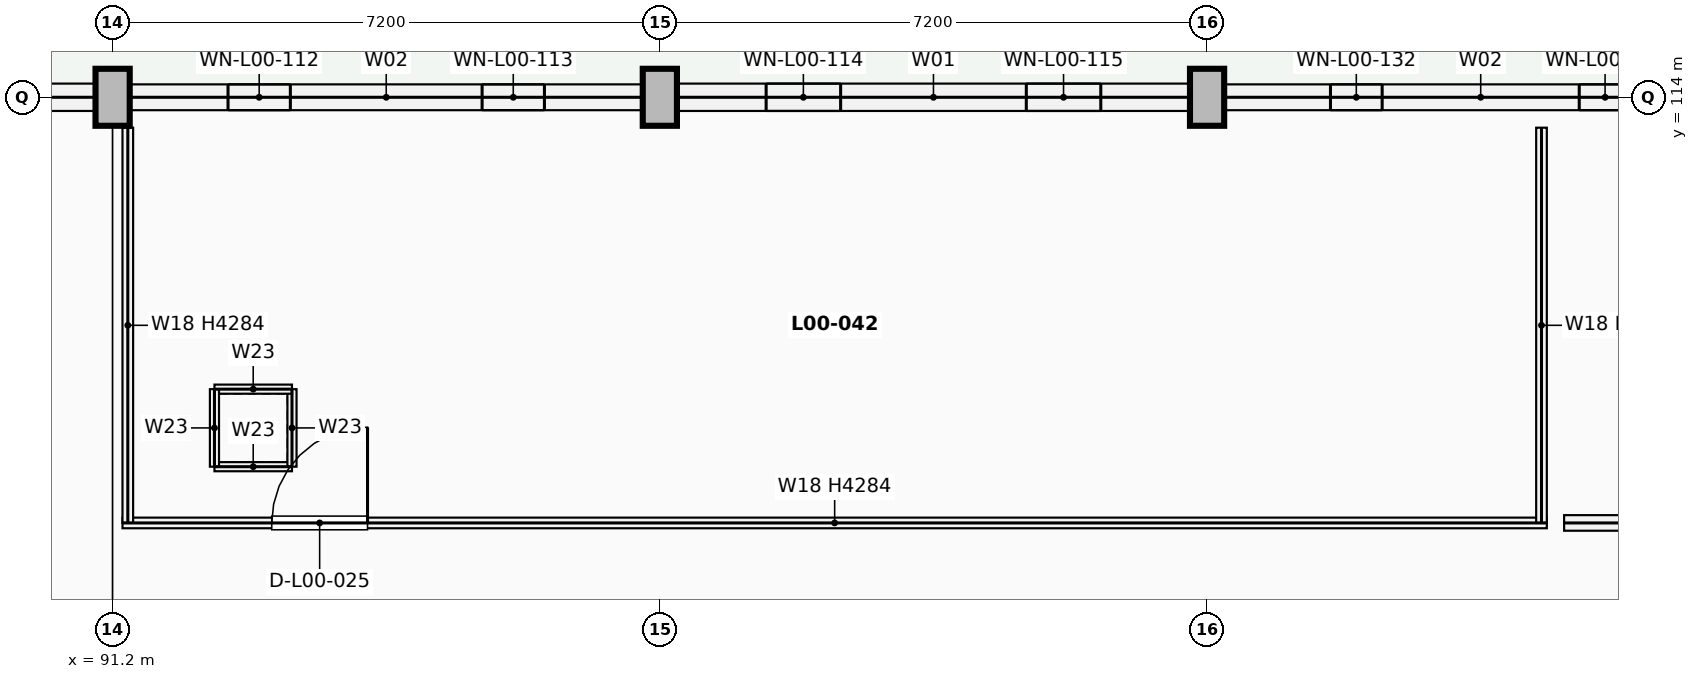
"""IFC4 building model, lengths in metres.
Left out: names, types, materials, properties, quantities, classifications, styles, units other than length and angle.
Written with IfcOpenShell. Run it as: python <this file> out.ifc"""

import sys

from ifc_helpers import new_model, si_unit, direction, frame, frame_2d, origin, origin_2d, place, context, subcontext, project, spatial, rectangle, extrude, element, fill, save


model = new_model("IFC4")
c1 = context("Model", 3, precision=1e-05, world=origin(), true_north=direction((0.0, 1.0)))
c2 = subcontext(c1, "Body", "Model", "MODEL_VIEW")
j1 = project(units=[si_unit("LENGTHUNIT", "METRE"), si_unit("PLANEANGLEUNIT", "RADIAN")], contexts=[c1])
p1 = place(None, origin())
s1 = spatial("IfcSite", under=j1, at=p1, CompositionType="ELEMENT")
p2 = place(p1, origin())
s2 = spatial("IfcBuilding", under=s1, at=p2, CompositionType="ELEMENT")
p3 = place(p2, origin())
s3 = spatial("IfcBuildingStorey", under=s2, at=p3, CompositionType="ELEMENT", Elevation=0.0)
for number, where, z_axis, x_axis in (
    (1, (91.2, 114.0, 0.0), (0.0, 0.0, 1.0), (1.0, 0.0, 0.0)),
    (2, (98.4, 114.0, 0.0), (0.0, 0.0, 1.0), (1.0, 0.0, 0.0)),
    (3, (105.6, 114.0, 0.0), (0.0, 0.0, 1.0), (1.0, 0.0, 0.0)),
):
    element("IfcColumn", number, at=place(p3, frame(where, z_axis=z_axis, x_axis=x_axis)), inside=s3, PredefinedType="PILASTER", context=c2, shape_type="SweptSolid", body=[
        extrude(rectangle(XDim=0.45, YDim=0.75, at=origin_2d()), origin(), (0.0, 0.0, 1.0), 5.1),
    ])
p4 = place(p3, frame((84.227, 114.0, 0.0), z_axis=(0.0, 0.0, 1.0), x_axis=(1.0, 0.0, 0.0)))
e4 = element("IfcWall", 4, at=p4, inside=s3, PredefinedType="SOLIDWALL", context=c2, shape_type="SweptSolid", body=[
    extrude(rectangle(XDim=6.746, YDim=0.36, at=frame_2d((3.373, 0.0))), origin(), (0.0, 0.0, 1.0), 4.284),
])
p5 = place(p4, frame((1.292, 0.0, 0.75)))
e5 = element("IfcOpeningElement", 5, at=p5, cuts=e4, PredefinedType="OPENING", context=c2, shape_type="SweptSolid", body=[
    extrude(rectangle(XDim=0.82, YDim=2.22, at=frame_2d((0.41, 1.11))), frame((0.0, 0.19, 0.0), z_axis=(0.0, -1.0, 0.0), x_axis=(1.0, 0.0, 0.0)), (0.0, 0.0, 1.0), 0.38),
])
p6 = place(p4, frame((4.635, 0.0, 0.75)))
e6 = element("IfcOpeningElement", 6, at=p6, cuts=e4, PredefinedType="OPENING", context=c2, shape_type="SweptSolid", body=[
    extrude(rectangle(XDim=0.82, YDim=2.22, at=frame_2d((0.41, 1.11))), frame((0.0, 0.19, 0.0), z_axis=(0.0, -1.0, 0.0), x_axis=(1.0, 0.0, 0.0)), (0.0, 0.0, 1.0), 0.38),
])
p7 = place(p3, frame((91.427, 114.0, 0.0), z_axis=(0.0, 0.0, 1.0), x_axis=(1.0, 0.0, 0.0)))
e7 = element("IfcWall", 7, at=p7, inside=s3, PredefinedType="SOLIDWALL", context=c2, shape_type="SweptSolid", body=[
    extrude(rectangle(XDim=6.746, YDim=0.34, at=frame_2d((3.373, 0.0))), origin(), (0.0, 0.0, 1.0), 4.284),
])
p8 = place(p7, frame((1.292, 0.0, 0.75)))
e8 = element("IfcOpeningElement", 8, at=p8, cuts=e7, PredefinedType="OPENING", context=c2, shape_type="SweptSolid", body=[
    extrude(rectangle(XDim=0.82, YDim=1.82, at=frame_2d((0.41, 0.91))), frame((0.0, 0.18, 0.0), z_axis=(0.0, -1.0, 0.0), x_axis=(1.0, 0.0, 0.0)), (0.0, 0.0, 1.0), 0.36),
])
p9 = place(p7, frame((4.635, 0.0, 0.75)))
e9 = element("IfcOpeningElement", 9, at=p9, cuts=e7, PredefinedType="OPENING", context=c2, shape_type="SweptSolid", body=[
    extrude(rectangle(XDim=0.82, YDim=1.82, at=frame_2d((0.41, 0.91))), frame((0.0, 0.18, 0.0), z_axis=(0.0, -1.0, 0.0), x_axis=(1.0, 0.0, 0.0)), (0.0, 0.0, 1.0), 0.36),
])
p10 = place(p3, frame((98.627, 114.0, 0.0), z_axis=(0.0, 0.0, 1.0), x_axis=(1.0, 0.0, 0.0)))
e10 = element("IfcWall", 10, at=p10, inside=s3, PredefinedType="SOLIDWALL", context=c2, shape_type="SweptSolid", body=[
    extrude(rectangle(XDim=6.746, YDim=0.36, at=frame_2d((3.373, 0.0))), origin(), (0.0, 0.0, 1.0), 4.284),
])
p11 = place(p10, frame((1.171, 0.0, 0.75)))
e11 = element("IfcOpeningElement", 11, at=p11, cuts=e10, PredefinedType="OPENING", context=c2, shape_type="SweptSolid", body=[
    extrude(rectangle(XDim=0.98, YDim=2.08, at=frame_2d((0.49, 1.04))), frame((0.0, 0.19, 0.0), z_axis=(0.0, -1.0, 0.0), x_axis=(1.0, 0.0, 0.0)), (0.0, 0.0, 1.0), 0.38),
])
p12 = place(p10, frame((4.594, 0.0, 0.75)))
e12 = element("IfcOpeningElement", 12, at=p12, cuts=e10, PredefinedType="OPENING", context=c2, shape_type="SweptSolid", body=[
    extrude(rectangle(XDim=0.98, YDim=2.08, at=frame_2d((0.49, 1.04))), frame((0.0, 0.19, 0.0), z_axis=(0.0, -1.0, 0.0), x_axis=(1.0, 0.0, 0.0)), (0.0, 0.0, 1.0), 0.38),
])
p13 = place(p3, frame((105.827, 114.0, 0.0), z_axis=(0.0, 0.0, 1.0), x_axis=(1.0, 0.0, 0.0)))
e13 = element("IfcWall", 13, at=p13, inside=s3, PredefinedType="SOLIDWALL", context=c2, shape_type="SweptSolid", body=[
    extrude(rectangle(XDim=6.746, YDim=0.34, at=frame_2d((3.373, 0.0))), origin(), (0.0, 0.0, 1.0), 4.284),
])
p14 = place(p13, frame((1.396, 0.0, 0.75)))
e14 = element("IfcOpeningElement", 14, at=p14, cuts=e13, PredefinedType="OPENING", context=c2, shape_type="SweptSolid", body=[
    extrude(rectangle(XDim=0.68, YDim=2.16, at=frame_2d((0.34, 1.08))), frame((0.0, 0.18, 0.0), z_axis=(0.0, -1.0, 0.0), x_axis=(1.0, 0.0, 0.0)), (0.0, 0.0, 1.0), 0.36),
])
p15 = place(p13, frame((4.669, 0.0, 0.75)))
e15 = element("IfcOpeningElement", 15, at=p15, cuts=e13, PredefinedType="OPENING", context=c2, shape_type="SweptSolid", body=[
    extrude(rectangle(XDim=0.68, YDim=2.16, at=frame_2d((0.34, 1.08))), frame((0.0, 0.18, 0.0), z_axis=(0.0, -1.0, 0.0), x_axis=(1.0, 0.0, 0.0)), (0.0, 0.0, 1.0), 0.36),
])
for number, where, z_axis, x_axis in (
    (16, (92.54, 109.14, 0.0), (0.0, 0.0, 1.0), (1.0, 0.0, 0.0)),
    (17, (93.56, 109.14, 0.0), (0.0, 0.0, 1.0), (0.0, 1.0, 0.0)),
    (18, (93.56, 110.16, 0.0), (0.0, 0.0, 1.0), (-1.0, 0.0, 0.0)),
    (19, (92.54, 110.16, 0.0), (0.0, 0.0, 1.0), (0.0, -1.0, 0.0)),
):
    element("IfcWall", number, at=place(p3, frame(where, z_axis=z_axis, x_axis=x_axis)), inside=s3, PredefinedType="PARTITIONING", context=c2, shape_type="SweptSolid", body=[
        extrude(rectangle(XDim=1.02, YDim=0.12, at=frame_2d((0.51, 0.0))), origin(), (0.0, 0.0, 1.0), 4.774),
    ])
p16 = place(p3, frame((91.33, 108.4, 0.0), z_axis=(0.0, 0.0, 1.0), x_axis=(1.0, 0.0, 0.0)))
e20 = element("IfcWall", 20, at=p16, inside=s3, PredefinedType="PARTITIONING", context=c2, shape_type="SweptSolid", body=[
    extrude(rectangle(XDim=18.74, YDim=0.14, at=frame_2d((9.37, 0.0))), origin(), (0.0, 0.0, 1.0), 4.284),
])
p17 = place(p16, frame((1.964, 0.0, 0.0)))
e21 = element("IfcOpeningElement", 21, at=p17, cuts=e20, PredefinedType="OPENING", context=c2, shape_type="SweptSolid", body=[
    extrude(rectangle(XDim=1.26, YDim=2.26, at=frame_2d((0.63, 1.13))), frame((0.0, 0.08, 0.0), z_axis=(0.0, -1.0, 0.0), x_axis=(1.0, 0.0, 0.0)), (0.0, 0.0, 1.0), 0.16),
])
p18 = place(p3, frame((91.4, 108.4, 0.0), z_axis=(0.0, 0.0, 1.0), x_axis=(0.0, 1.0, 0.0)))
e22 = element("IfcWall", 22, at=p18, inside=s3, PredefinedType="PARTITIONING", context=c2, shape_type="SweptSolid", body=[
    extrude(rectangle(XDim=5.2, YDim=0.14, at=frame_2d((2.6, 0.0))), origin(), (0.0, 0.0, 1.0), 4.284),
])
p19 = place(p3, frame((110.0, 108.4, 0.0), z_axis=(0.0, 0.0, 1.0), x_axis=(0.0, 1.0, 0.0)))
e23 = element("IfcWall", 23, at=p19, inside=s3, PredefinedType="PARTITIONING", context=c2, shape_type="SweptSolid", body=[
    extrude(rectangle(XDim=5.2, YDim=0.14, at=frame_2d((2.6, 0.0))), origin(), (0.0, 0.0, 1.0), 4.774),
])
p20 = place(p3, frame((110.298, 108.4, 0.0), z_axis=(0.0, 0.0, 1.0), x_axis=(1.0, 0.0, 0.0)))
e24 = element("IfcWall", 24, at=p20, inside=s3, PredefinedType="PARTITIONING", context=c2, shape_type="SweptSolid", body=[
    extrude(rectangle(XDim=20.205, YDim=0.205, at=frame_2d((10.103, 0.0))), origin(), (0.0, 0.0, 1.0), 4.284),
])
p21 = place(p20, frame((4.94, 0.0, 0.0)))
e25 = element("IfcOpeningElement", 25, at=p21, cuts=e24, PredefinedType="OPENING", context=c2, shape_type="SweptSolid", body=[
    extrude(rectangle(XDim=1.05, YDim=2.15, at=frame_2d((0.525, 1.075))), frame((0.0, 0.113, 0.0), z_axis=(0.0, -1.0, 0.0), x_axis=(1.0, 0.0, 0.0)), (0.0, 0.0, 1.0), 0.225),
])
p22 = place(p8, origin())
e26 = element("IfcWindow", 26, at=p22, inside=s3, PartitioningType="SINGLE_PANEL", PredefinedType="WINDOW", context=c2, shape_type="SweptSolid", body=[
    extrude(rectangle(XDim=0.82, YDim=1.82, at=frame_2d((0.41, 0.91))), frame((0.0, 0.03, 0.0), z_axis=(0.0, -1.0, 0.0), x_axis=(1.0, 0.0, 0.0)), (0.0, 0.0, 1.0), 0.06),
])
fill(e8, e26)
p23 = place(p9, origin())
e27 = element("IfcWindow", 27, at=p23, inside=s3, PartitioningType="SINGLE_PANEL", PredefinedType="WINDOW", context=c2, shape_type="SweptSolid", body=[
    extrude(rectangle(XDim=0.82, YDim=1.82, at=frame_2d((0.41, 0.91))), frame((0.0, 0.03, 0.0), z_axis=(0.0, -1.0, 0.0), x_axis=(1.0, 0.0, 0.0)), (0.0, 0.0, 1.0), 0.06),
])
fill(e9, e27)
p24 = place(p11, origin())
e28 = element("IfcWindow", 28, at=p24, inside=s3, PartitioningType="SINGLE_PANEL", PredefinedType="WINDOW", context=c2, shape_type="SweptSolid", body=[
    extrude(rectangle(XDim=0.98, YDim=2.08, at=frame_2d((0.49, 1.04))), frame((0.0, 0.03, 0.0), z_axis=(0.0, -1.0, 0.0), x_axis=(1.0, 0.0, 0.0)), (0.0, 0.0, 1.0), 0.06),
])
fill(e11, e28)
p25 = place(p12, origin())
e29 = element("IfcWindow", 29, at=p25, inside=s3, PartitioningType="SINGLE_PANEL", PredefinedType="WINDOW", context=c2, shape_type="SweptSolid", body=[
    extrude(rectangle(XDim=0.98, YDim=2.08, at=frame_2d((0.49, 1.04))), frame((0.0, 0.03, 0.0), z_axis=(0.0, -1.0, 0.0), x_axis=(1.0, 0.0, 0.0)), (0.0, 0.0, 1.0), 0.06),
])
fill(e12, e29)
p26 = place(p14, origin())
e30 = element("IfcWindow", 30, at=p26, inside=s3, PartitioningType="SINGLE_PANEL", PredefinedType="WINDOW", context=c2, shape_type="SweptSolid", body=[
    extrude(rectangle(XDim=0.68, YDim=2.16, at=frame_2d((0.34, 1.08))), frame((0.0, 0.03, 0.0), z_axis=(0.0, -1.0, 0.0), x_axis=(1.0, 0.0, 0.0)), (0.0, 0.0, 1.0), 0.06),
])
fill(e14, e30)
p27 = place(p15, origin())
e31 = element("IfcWindow", 31, at=p27, inside=s3, PartitioningType="SINGLE_PANEL", PredefinedType="WINDOW", context=c2, shape_type="SweptSolid", body=[
    extrude(rectangle(XDim=0.68, YDim=2.16, at=frame_2d((0.34, 1.08))), frame((0.0, 0.03, 0.0), z_axis=(0.0, -1.0, 0.0), x_axis=(1.0, 0.0, 0.0)), (0.0, 0.0, 1.0), 0.06),
])
fill(e15, e31)
p28 = place(p17, origin())
e32 = element("IfcDoor", 32, at=p28, inside=s3, OperationType="SINGLE_SWING_RIGHT", PredefinedType="DOOR", context=c2, shape_type="SweptSolid", body=[
    extrude(rectangle(XDim=1.26, YDim=2.26, at=frame_2d((0.63, 1.13))), frame((0.0, 0.025, 0.0), z_axis=(0.0, -1.0, 0.0), x_axis=(1.0, 0.0, 0.0)), (0.0, 0.0, 1.0), 0.05),
])
fill(e21, e32)
save(model, sys.argv[1])
